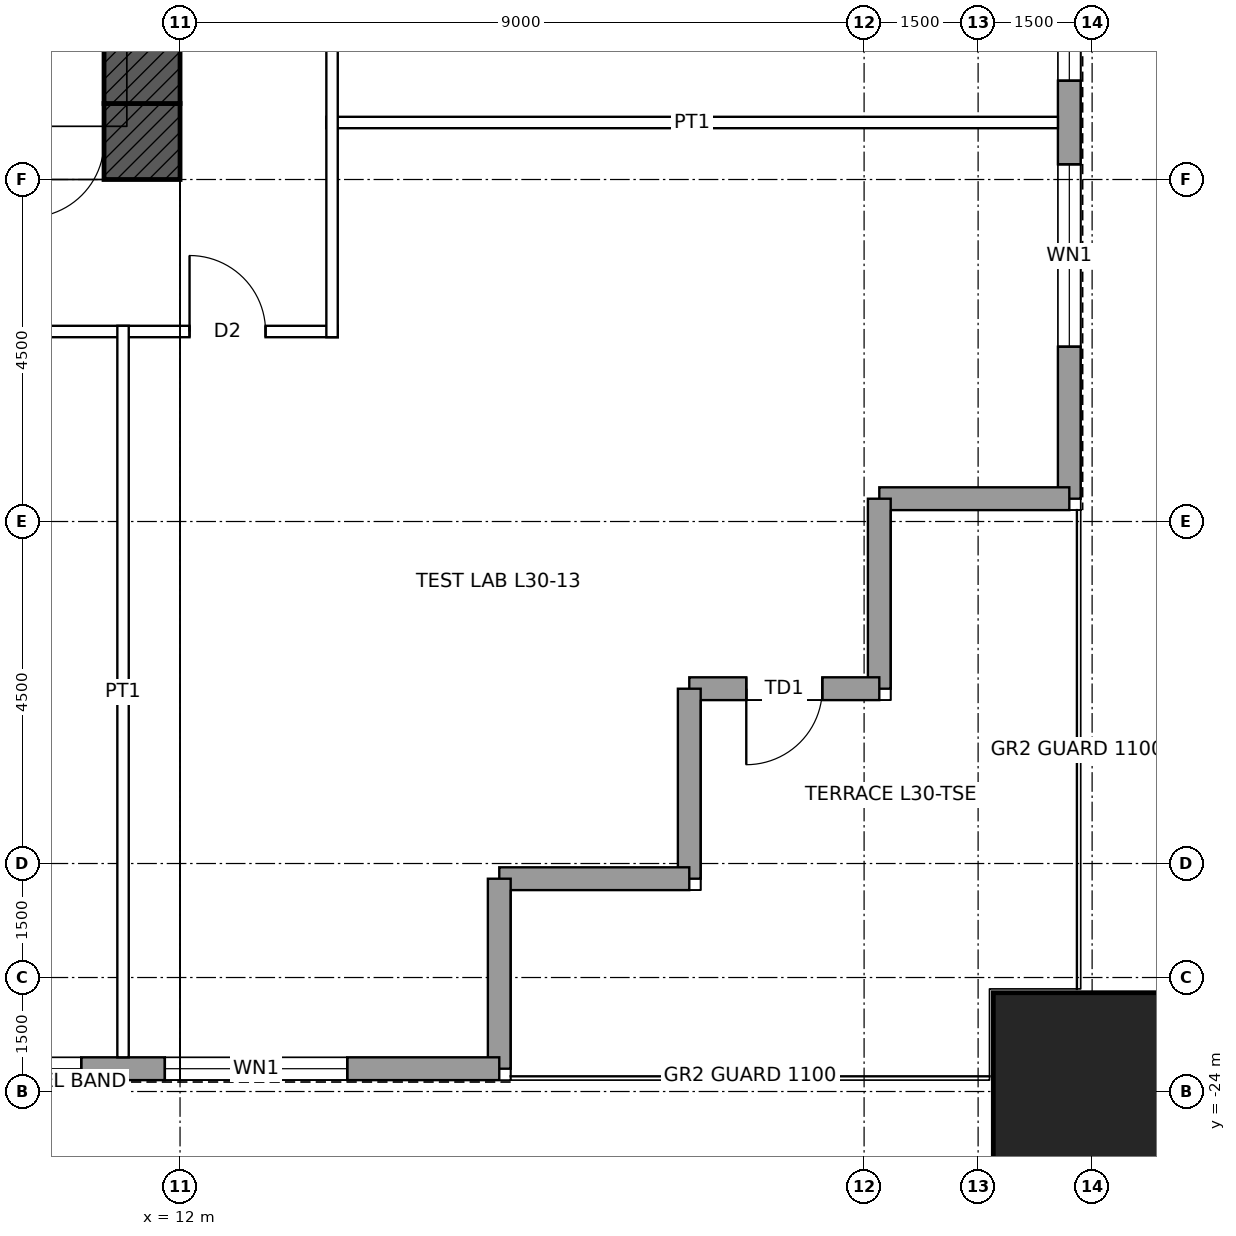
"""IFC4 building model, lengths in metres.
Left out: names, types, materials, properties, quantities, classifications, styles, units other than length and angle.
Written with IfcOpenShell. Run it as: python <this file> out.ifc"""

import sys

from ifc_helpers import new_model, si_unit, direction, frame, frame_2d, origin, origin_2d, place, context, subcontext, project, spatial, rectangle, hollow_rectangle, extrude, element, fill, save


model = new_model("IFC4")
c1 = context("Model", 3, precision=1e-05, world=origin(), true_north=direction((0.0, 1.0)))
c2 = subcontext(c1, "Body", "Model", "MODEL_VIEW")
j1 = project(units=[si_unit("LENGTHUNIT", "METRE"), si_unit("PLANEANGLEUNIT", "RADIAN")], contexts=[c1])
p1 = place(None, origin())
s1 = spatial("IfcSite", under=j1, at=p1, CompositionType="ELEMENT")
p2 = place(p1, origin())
s2 = spatial("IfcBuilding", under=s1, at=p2, CompositionType="ELEMENT")
p3 = place(p2, frame((0.0, 0.0, 149.4)))
s3 = spatial("IfcBuildingStorey", under=s2, at=p3, CompositionType="ELEMENT", Elevation=149.4)
p4 = place(p3, frame((24.0, -24.0, 0.0), z_axis=(0.0, 0.0, 1.0), x_axis=(1.0, 0.0, 0.0)))
e1 = element("IfcColumn", 1, at=p4, inside=s3, PredefinedType="COLUMN", context=c2, shape_type="SweptSolid", body=[
    extrude(hollow_rectangle(XDim=2.6, YDim=2.6, WallThickness=0.13, at=origin_2d()), origin(), (0.0, 0.0, 1.0), 4.5),
])
p5 = place(p3, frame((12.0, -11.5, 0.0), z_axis=(0.0, 0.0, 1.0), x_axis=(-1.0, 0.0, 0.0)))
e2 = element("IfcWall", 2, at=p5, inside=s3, PredefinedType="SHEAR", context=c2, shape_type="SweptSolid", body=[
    extrude(rectangle(XDim=24.0, YDim=1.0, at=frame_2d((12.0, 0.0))), origin(), (0.0, 0.0, 1.0), 4.5),
])
p6 = place(p5, frame((11.5, 0.0, 0.0)))
e3 = element("IfcOpeningElement", 3, at=p6, cuts=e2, PredefinedType="OPENING", context=c2, shape_type="SweptSolid", body=[
    extrude(rectangle(XDim=1.0, YDim=2.1, at=frame_2d((0.5, 1.05))), frame((0.0, 0.51, 0.0), z_axis=(0.0, -1.0, 0.0), x_axis=(1.0, 0.0, 0.0)), (0.0, 0.0, 1.0), 1.02),
])
p7 = place(p5, frame((1.0, 0.0, 0.0)))
e4 = element("IfcOpeningElement", 4, at=p7, cuts=e2, PredefinedType="OPENING", context=c2, shape_type="SweptSolid", body=[
    extrude(rectangle(XDim=1.0, YDim=2.4, at=frame_2d((0.5, 1.2))), frame((0.0, 0.51, 0.0), z_axis=(0.0, -1.0, 0.0), x_axis=(1.0, 0.0, 0.0)), (0.0, 0.0, 1.0), 1.02),
])
p8 = place(p3, frame((11.5, 11.0, 0.0), z_axis=(0.0, 0.0, 1.0), x_axis=(0.0, -1.0, 0.0)))
e5 = element("IfcWall", 5, at=p8, inside=s3, PredefinedType="SHEAR", context=c2, shape_type="SweptSolid", body=[
    extrude(rectangle(XDim=22.0, YDim=1.0, at=frame_2d((11.0, 0.0))), origin(), (0.0, 0.0, 1.0), 4.5),
])
p9 = place(p8, frame((10.5, 0.0, 0.0)))
e6 = element("IfcOpeningElement", 6, at=p9, cuts=e5, PredefinedType="OPENING", context=c2, shape_type="SweptSolid", body=[
    extrude(rectangle(XDim=1.0, YDim=2.4, at=frame_2d((0.5, 1.2))), frame((0.0, 0.51, 0.0), z_axis=(0.0, -1.0, 0.0), x_axis=(1.0, 0.0, 0.0)), (0.0, 0.0, 1.0), 1.02),
])
p10 = place(p3, frame((23.7, 16.2, 0.0), z_axis=(0.0, 0.0, 1.0), x_axis=(0.0, -1.0, 0.0)))
e7 = element("IfcWall", 7, at=p10, inside=s3, PredefinedType="SOLIDWALL", context=c2, shape_type="SweptSolid", body=[
    extrude(rectangle(XDim=32.4, YDim=0.3, at=frame_2d((16.2, 0.0))), origin(), (0.0, 0.0, 1.0), 4.3),
])
p11 = place(p10, frame((2.0, 0.0, 1.0)))
e8 = element("IfcOpeningElement", 8, at=p11, cuts=e7, PredefinedType="OPENING", context=c2, shape_type="SweptSolid", body=[
    extrude(rectangle(XDim=2.4, YDim=1.2, at=frame_2d((1.2, 0.6))), frame((0.0, 0.16, 0.0), z_axis=(0.0, -1.0, 0.0), x_axis=(1.0, 0.0, 0.0)), (0.0, 0.0, 1.0), 0.32),
])
p12 = place(p10, frame((5.5, 0.0, 1.0)))
e9 = element("IfcOpeningElement", 9, at=p12, cuts=e7, PredefinedType="OPENING", context=c2, shape_type="SweptSolid", body=[
    extrude(rectangle(XDim=2.4, YDim=1.2, at=frame_2d((1.2, 0.6))), frame((0.0, 0.16, 0.0), z_axis=(0.0, -1.0, 0.0), x_axis=(1.0, 0.0, 0.0)), (0.0, 0.0, 1.0), 0.32),
])
p13 = place(p10, frame((11.8, 0.0, 1.0)))
e10 = element("IfcOpeningElement", 10, at=p13, cuts=e7, PredefinedType="OPENING", context=c2, shape_type="SweptSolid", body=[
    extrude(rectangle(XDim=1.8, YDim=1.2, at=frame_2d((0.9, 0.6))), frame((0.0, 0.16, 0.0), z_axis=(0.0, -1.0, 0.0), x_axis=(1.0, 0.0, 0.0)), (0.0, 0.0, 1.0), 0.32),
])
p14 = place(p10, frame((13.9, 0.0, 1.0)))
e11 = element("IfcOpeningElement", 11, at=p14, cuts=e7, PredefinedType="OPENING", context=c2, shape_type="SweptSolid", body=[
    extrude(rectangle(XDim=1.8, YDim=1.2, at=frame_2d((0.9, 0.6))), frame((0.0, 0.16, 0.0), z_axis=(0.0, -1.0, 0.0), x_axis=(1.0, 0.0, 0.0)), (0.0, 0.0, 1.0), 0.32),
])
p15 = place(p10, frame((16.1, 0.0, 1.0)))
e12 = element("IfcOpeningElement", 12, at=p15, cuts=e7, PredefinedType="OPENING", context=c2, shape_type="SweptSolid", body=[
    extrude(rectangle(XDim=2.4, YDim=1.2, at=frame_2d((1.2, 0.6))), frame((0.0, 0.16, 0.0), z_axis=(0.0, -1.0, 0.0), x_axis=(1.0, 0.0, 0.0)), (0.0, 0.0, 1.0), 0.32),
])
p16 = place(p10, frame((18.8, 0.0, 1.0)))
e13 = element("IfcOpeningElement", 13, at=p16, cuts=e7, PredefinedType="OPENING", context=c2, shape_type="SweptSolid", body=[
    extrude(rectangle(XDim=1.8, YDim=1.2, at=frame_2d((0.9, 0.6))), frame((0.0, 0.16, 0.0), z_axis=(0.0, -1.0, 0.0), x_axis=(1.0, 0.0, 0.0)), (0.0, 0.0, 1.0), 0.32),
])
p17 = place(p10, frame((24.5, 0.0, 1.0)))
e14 = element("IfcOpeningElement", 14, at=p17, cuts=e7, PredefinedType="OPENING", context=c2, shape_type="SweptSolid", body=[
    extrude(rectangle(XDim=2.4, YDim=1.2, at=frame_2d((1.2, 0.6))), frame((0.0, 0.16, 0.0), z_axis=(0.0, -1.0, 0.0), x_axis=(1.0, 0.0, 0.0)), (0.0, 0.0, 1.0), 0.32),
])
p18 = place(p10, frame((28.0, 0.0, 1.0)))
e15 = element("IfcOpeningElement", 15, at=p18, cuts=e7, PredefinedType="OPENING", context=c2, shape_type="SweptSolid", body=[
    extrude(rectangle(XDim=2.4, YDim=1.2, at=frame_2d((1.2, 0.6))), frame((0.0, 0.16, 0.0), z_axis=(0.0, -1.0, 0.0), x_axis=(1.0, 0.0, 0.0)), (0.0, 0.0, 1.0), 0.32),
])
for number, where, z_axis, x_axis in (
    (16, (23.7, -16.2, 0.0), (0.0, 0.0, 1.0), (-1.0, 0.0, 0.0)),
    (17, (21.2, -16.2, 0.0), (0.0, 0.0, 1.0), (0.0, -1.0, 0.0)),
):
    element("IfcWall", number, at=place(p3, frame(where, z_axis=z_axis, x_axis=x_axis)), inside=s3, PredefinedType="SOLIDWALL", context=c2, shape_type="SweptSolid", body=[
        extrude(rectangle(XDim=2.5, YDim=0.3, at=frame_2d((1.25, 0.0))), origin(), (0.0, 0.0, 1.0), 4.3),
    ])
p19 = place(p3, frame((21.2, -18.7, 0.0), z_axis=(0.0, 0.0, 1.0), x_axis=(-1.0, 0.0, 0.0)))
e18 = element("IfcWall", 18, at=p19, inside=s3, PredefinedType="SOLIDWALL", context=c2, shape_type="SweptSolid", body=[
    extrude(rectangle(XDim=2.5, YDim=0.3, at=frame_2d((1.25, 0.0))), origin(), (0.0, 0.0, 1.0), 4.3),
])
p20 = place(p19, frame((0.75, 0.0, 0.0)))
e19 = element("IfcOpeningElement", 19, at=p20, cuts=e18, PredefinedType="OPENING", context=c2, shape_type="SweptSolid", body=[
    extrude(rectangle(XDim=1.0, YDim=2.4, at=frame_2d((0.5, 1.2))), frame((0.0, 0.16, 0.0), z_axis=(0.0, -1.0, 0.0), x_axis=(1.0, 0.0, 0.0)), (0.0, 0.0, 1.0), 0.32),
])
for number, where, z_axis, x_axis in (
    (20, (18.7, -18.7, 0.0), (0.0, 0.0, 1.0), (0.0, -1.0, 0.0)),
    (21, (18.7, -21.2, 0.0), (0.0, 0.0, 1.0), (-1.0, 0.0, 0.0)),
    (22, (16.2, -21.2, 0.0), (0.0, 0.0, 1.0), (0.0, -1.0, 0.0)),
):
    element("IfcWall", number, at=place(p3, frame(where, z_axis=z_axis, x_axis=x_axis)), inside=s3, PredefinedType="SOLIDWALL", context=c2, shape_type="SweptSolid", body=[
        extrude(rectangle(XDim=2.5, YDim=0.3, at=frame_2d((1.25, 0.0))), origin(), (0.0, 0.0, 1.0), 4.3),
    ])
p21 = place(p3, frame((16.2, -23.7, 0.0), z_axis=(0.0, 0.0, 1.0), x_axis=(-1.0, 0.0, 0.0)))
e23 = element("IfcWall", 23, at=p21, inside=s3, PredefinedType="SOLIDWALL", context=c2, shape_type="SweptSolid", body=[
    extrude(rectangle(XDim=32.4, YDim=0.3, at=frame_2d((16.2, 0.0))), origin(), (0.0, 0.0, 1.0), 4.3),
])
p22 = place(p21, frame((2.0, 0.0, 1.0)))
e24 = element("IfcOpeningElement", 24, at=p22, cuts=e23, PredefinedType="OPENING", context=c2, shape_type="SweptSolid", body=[
    extrude(rectangle(XDim=2.4, YDim=1.2, at=frame_2d((1.2, 0.6))), frame((0.0, 0.16, 0.0), z_axis=(0.0, -1.0, 0.0), x_axis=(1.0, 0.0, 0.0)), (0.0, 0.0, 1.0), 0.32),
])
p23 = place(p21, frame((5.5, 0.0, 1.0)))
e25 = element("IfcOpeningElement", 25, at=p23, cuts=e23, PredefinedType="OPENING", context=c2, shape_type="SweptSolid", body=[
    extrude(rectangle(XDim=2.4, YDim=1.2, at=frame_2d((1.2, 0.6))), frame((0.0, 0.16, 0.0), z_axis=(0.0, -1.0, 0.0), x_axis=(1.0, 0.0, 0.0)), (0.0, 0.0, 1.0), 0.32),
])
p24 = place(p21, frame((11.8, 0.0, 1.0)))
e26 = element("IfcOpeningElement", 26, at=p24, cuts=e23, PredefinedType="OPENING", context=c2, shape_type="SweptSolid", body=[
    extrude(rectangle(XDim=1.8, YDim=1.2, at=frame_2d((0.9, 0.6))), frame((0.0, 0.16, 0.0), z_axis=(0.0, -1.0, 0.0), x_axis=(1.0, 0.0, 0.0)), (0.0, 0.0, 1.0), 0.32),
])
p25 = place(p21, frame((13.9, 0.0, 1.0)))
e27 = element("IfcOpeningElement", 27, at=p25, cuts=e23, PredefinedType="OPENING", context=c2, shape_type="SweptSolid", body=[
    extrude(rectangle(XDim=1.8, YDim=1.2, at=frame_2d((0.9, 0.6))), frame((0.0, 0.16, 0.0), z_axis=(0.0, -1.0, 0.0), x_axis=(1.0, 0.0, 0.0)), (0.0, 0.0, 1.0), 0.32),
])
p26 = place(p21, frame((16.1, 0.0, 1.0)))
e28 = element("IfcOpeningElement", 28, at=p26, cuts=e23, PredefinedType="OPENING", context=c2, shape_type="SweptSolid", body=[
    extrude(rectangle(XDim=2.4, YDim=1.2, at=frame_2d((1.2, 0.6))), frame((0.0, 0.16, 0.0), z_axis=(0.0, -1.0, 0.0), x_axis=(1.0, 0.0, 0.0)), (0.0, 0.0, 1.0), 0.32),
])
p27 = place(p21, frame((18.8, 0.0, 1.0)))
e29 = element("IfcOpeningElement", 29, at=p27, cuts=e23, PredefinedType="OPENING", context=c2, shape_type="SweptSolid", body=[
    extrude(rectangle(XDim=1.8, YDim=1.2, at=frame_2d((0.9, 0.6))), frame((0.0, 0.16, 0.0), z_axis=(0.0, -1.0, 0.0), x_axis=(1.0, 0.0, 0.0)), (0.0, 0.0, 1.0), 0.32),
])
p28 = place(p21, frame((24.5, 0.0, 1.0)))
e30 = element("IfcOpeningElement", 30, at=p28, cuts=e23, PredefinedType="OPENING", context=c2, shape_type="SweptSolid", body=[
    extrude(rectangle(XDim=2.4, YDim=1.2, at=frame_2d((1.2, 0.6))), frame((0.0, 0.16, 0.0), z_axis=(0.0, -1.0, 0.0), x_axis=(1.0, 0.0, 0.0)), (0.0, 0.0, 1.0), 0.32),
])
p29 = place(p21, frame((28.0, 0.0, 1.0)))
e31 = element("IfcOpeningElement", 31, at=p29, cuts=e23, PredefinedType="OPENING", context=c2, shape_type="SweptSolid", body=[
    extrude(rectangle(XDim=2.4, YDim=1.2, at=frame_2d((1.2, 0.6))), frame((0.0, 0.16, 0.0), z_axis=(0.0, -1.0, 0.0), x_axis=(1.0, 0.0, 0.0)), (0.0, 0.0, 1.0), 0.32),
])
p30 = place(p3, frame((-14.075, -14.0, 0.0), z_axis=(0.0, 0.0, 1.0), x_axis=(1.0, 0.0, 0.0)))
e32 = element("IfcWall", 32, at=p30, inside=s3, PredefinedType="PARTITIONING", context=c2, shape_type="SweptSolid", body=[
    extrude(rectangle(XDim=28.15, YDim=0.15, at=frame_2d((14.075, 0.0))), origin(), (0.0, 0.0, 1.0), 4.3),
])
p31 = place(p30, frame((18.8, 0.0, 0.0)))
e33 = element("IfcOpeningElement", 33, at=p31, cuts=e32, PredefinedType="OPENING", context=c2, shape_type="SweptSolid", body=[
    extrude(rectangle(XDim=1.8, YDim=2.4, at=frame_2d((0.9, 1.2))), frame((0.0, 0.085, 0.0), z_axis=(0.0, -1.0, 0.0), x_axis=(1.0, 0.0, 0.0)), (0.0, 0.0, 1.0), 0.17),
])
p32 = place(p30, frame((9.425, 0.0, 0.0)))
e34 = element("IfcOpeningElement", 34, at=p32, cuts=e32, PredefinedType="OPENING", context=c2, shape_type="SweptSolid", body=[
    extrude(rectangle(XDim=1.8, YDim=2.4, at=frame_2d((0.9, 1.2))), frame((0.0, 0.085, 0.0), z_axis=(0.0, -1.0, 0.0), x_axis=(1.0, 0.0, 0.0)), (0.0, 0.0, 1.0), 0.17),
])
p33 = place(p30, frame((4.2, 0.0, 0.0)))
e35 = element("IfcOpeningElement", 35, at=p33, cuts=e32, PredefinedType="OPENING", context=c2, shape_type="SweptSolid", body=[
    extrude(rectangle(XDim=1.0, YDim=2.1, at=frame_2d((0.5, 1.05))), frame((0.0, 0.085, 0.0), z_axis=(0.0, -1.0, 0.0), x_axis=(1.0, 0.0, 0.0)), (0.0, 0.0, 1.0), 0.17),
])
p34 = place(p30, frame((26.2, 0.0, 0.0)))
e36 = element("IfcOpeningElement", 36, at=p34, cuts=e32, PredefinedType="OPENING", context=c2, shape_type="SweptSolid", body=[
    extrude(rectangle(XDim=1.0, YDim=2.1, at=frame_2d((0.5, 1.05))), frame((0.0, 0.085, 0.0), z_axis=(0.0, -1.0, 0.0), x_axis=(1.0, 0.0, 0.0)), (0.0, 0.0, 1.0), 0.17),
])
p35 = place(p30, frame((0.95, 0.0, 0.0)))
e37 = element("IfcOpeningElement", 37, at=p35, cuts=e32, PredefinedType="OPENING", context=c2, shape_type="SweptSolid", body=[
    extrude(rectangle(XDim=1.0, YDim=2.1, at=frame_2d((0.5, 1.05))), frame((0.0, 0.085, 0.0), z_axis=(0.0, -1.0, 0.0), x_axis=(1.0, 0.0, 0.0)), (0.0, 0.0, 1.0), 0.17),
])
for number, where, z_axis, x_axis in (
    (38, (13.925, -11.25, 0.0), (0.0, 0.0, 1.0), (1.0, 0.0, 0.0)),
    (39, (11.25, -23.55, 0.0), (0.0, 0.0, 1.0), (0.0, 1.0, 0.0)),
):
    element("IfcWall", number, at=place(p3, frame(where, z_axis=z_axis, x_axis=x_axis)), inside=s3, PredefinedType="PARTITIONING", context=c2, shape_type="SweptSolid", body=[
        extrude(rectangle(XDim=9.625, YDim=0.15, at=frame_2d((4.812, 0.0))), origin(), (0.0, 0.0, 1.0), 3.431),
    ])
p36 = place(p3, frame((14.0, -14.075, 0.0), z_axis=(0.0, 0.0, 1.0), x_axis=(0.0, 1.0, 0.0)))
e40 = element("IfcWall", 40, at=p36, inside=s3, PredefinedType="PARTITIONING", context=c2, shape_type="SweptSolid", body=[
    extrude(rectangle(XDim=26.15, YDim=0.15, at=frame_2d((13.075, 0.0))), origin(), (0.0, 0.0, 1.0), 4.3),
])
p37 = place(p36, frame((18.8, 0.0, 0.0)))
e41 = element("IfcOpeningElement", 41, at=p37, cuts=e40, PredefinedType="OPENING", context=c2, shape_type="SweptSolid", body=[
    extrude(rectangle(XDim=1.8, YDim=2.4, at=frame_2d((0.9, 1.2))), frame((0.0, 0.085, 0.0), z_axis=(0.0, -1.0, 0.0), x_axis=(1.0, 0.0, 0.0)), (0.0, 0.0, 1.0), 0.17),
])
p38 = place(p36, frame((7.55, 0.0, 0.0)))
e42 = element("IfcOpeningElement", 42, at=p38, cuts=e40, PredefinedType="OPENING", context=c2, shape_type="SweptSolid", body=[
    extrude(rectangle(XDim=1.8, YDim=2.4, at=frame_2d((0.9, 1.2))), frame((0.0, 0.085, 0.0), z_axis=(0.0, -1.0, 0.0), x_axis=(1.0, 0.0, 0.0)), (0.0, 0.0, 1.0), 0.17),
])
p39 = place(p17, origin())
e43 = element("IfcWindow", 43, at=p39, inside=s3, PartitioningType="SINGLE_PANEL", PredefinedType="WINDOW", context=c2, shape_type="SweptSolid", body=[
    extrude(rectangle(XDim=2.4, YDim=1.2, at=frame_2d((1.2, 0.6))), frame((0.0, 0.03, 0.0), z_axis=(0.0, -1.0, 0.0), x_axis=(1.0, 0.0, 0.0)), (0.0, 0.0, 1.0), 0.06),
])
fill(e14, e43)
p40 = place(p18, origin())
e44 = element("IfcWindow", 44, at=p40, inside=s3, PartitioningType="SINGLE_PANEL", PredefinedType="WINDOW", context=c2, shape_type="SweptSolid", body=[
    extrude(rectangle(XDim=2.4, YDim=1.2, at=frame_2d((1.2, 0.6))), frame((0.0, 0.03, 0.0), z_axis=(0.0, -1.0, 0.0), x_axis=(1.0, 0.0, 0.0)), (0.0, 0.0, 1.0), 0.06),
])
fill(e15, e44)
p41 = place(p20, origin())
e45 = element("IfcDoor", 45, at=p41, inside=s3, OperationType="SINGLE_SWING_RIGHT", PredefinedType="DOOR", context=c2, shape_type="SweptSolid", body=[
    extrude(rectangle(XDim=1.0, YDim=2.4, at=frame_2d((0.5, 1.2))), frame((0.0, 0.025, 0.0), z_axis=(0.0, -1.0, 0.0), x_axis=(1.0, 0.0, 0.0)), (0.0, 0.0, 1.0), 0.05),
])
fill(e19, e45)
p42 = place(p22, origin())
e46 = element("IfcWindow", 46, at=p42, inside=s3, PartitioningType="SINGLE_PANEL", PredefinedType="WINDOW", context=c2, shape_type="SweptSolid", body=[
    extrude(rectangle(XDim=2.4, YDim=1.2, at=frame_2d((1.2, 0.6))), frame((0.0, 0.03, 0.0), z_axis=(0.0, -1.0, 0.0), x_axis=(1.0, 0.0, 0.0)), (0.0, 0.0, 1.0), 0.06),
])
fill(e24, e46)
p43 = place(p23, origin())
e47 = element("IfcWindow", 47, at=p43, inside=s3, PartitioningType="SINGLE_PANEL", PredefinedType="WINDOW", context=c2, shape_type="SweptSolid", body=[
    extrude(rectangle(XDim=2.4, YDim=1.2, at=frame_2d((1.2, 0.6))), frame((0.0, 0.03, 0.0), z_axis=(0.0, -1.0, 0.0), x_axis=(1.0, 0.0, 0.0)), (0.0, 0.0, 1.0), 0.06),
])
fill(e25, e47)
p44 = place(p7, origin())
e48 = element("IfcDoor", 48, at=p44, inside=s3, OperationType="SINGLE_SWING_RIGHT", PredefinedType="DOOR", context=c2, shape_type="SweptSolid", body=[
    extrude(rectangle(XDim=1.0, YDim=2.4, at=frame_2d((0.5, 1.2))), frame((0.0, 0.485, 0.0), z_axis=(0.0, -1.0, 0.0), x_axis=(1.0, 0.0, 0.0)), (0.0, 0.0, 1.0), 0.05),
])
fill(e4, e48)
p45 = place(p34, origin())
e49 = element("IfcDoor", 49, at=p45, inside=s3, OperationType="SINGLE_SWING_LEFT", PredefinedType="DOOR", context=c2, shape_type="SweptSolid", body=[
    extrude(rectangle(XDim=1.0, YDim=2.1, at=frame_2d((0.5, 1.05))), frame((0.0, 0.025, 0.0), z_axis=(0.0, -1.0, 0.0), x_axis=(1.0, 0.0, 0.0)), (0.0, 0.0, 1.0), 0.05),
])
fill(e36, e49)
save(model, sys.argv[1])
